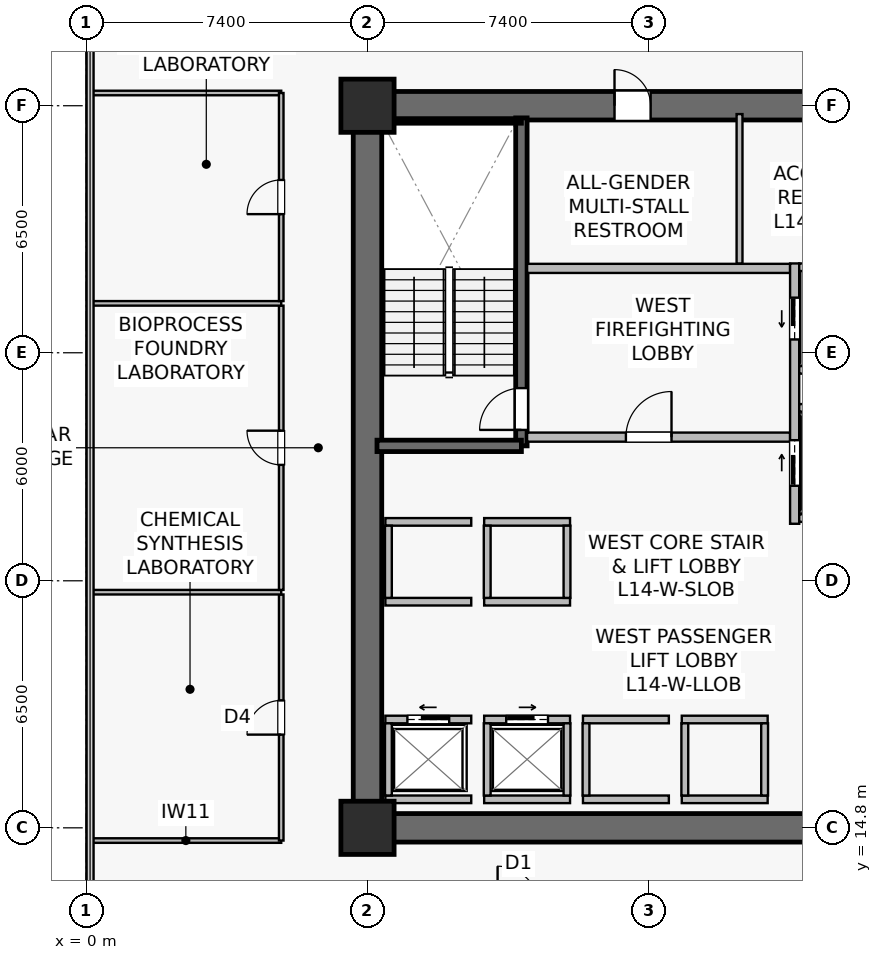
"""IFC4 building model, lengths in metres.
Left out: names, types, materials, properties, quantities, classifications, styles, units other than length and angle.
Written with IfcOpenShell. Run it as: python <this file> out.ifc"""

import sys

from ifc_helpers import new_model, si_unit, direction, frame, frame_2d, origin, origin_2d, place, context, subcontext, project, spatial, rectangle, extrude, source, transform, mapped, element, fill, save


model = new_model("IFC4")
c1 = context("Model", 3, precision=1e-05, world=origin(), true_north=direction((0.0, 1.0)))
c2 = subcontext(c1, "Body", "Model", "MODEL_VIEW")
j1 = project(units=[si_unit("LENGTHUNIT", "METRE"), si_unit("PLANEANGLEUNIT", "RADIAN")], contexts=[c1])
p1 = place(None, origin())
s1 = spatial("IfcSite", under=j1, at=p1, CompositionType="ELEMENT")
p2 = place(p1, origin())
s2 = spatial("IfcBuilding", under=s1, at=p2, CompositionType="ELEMENT")
p3 = place(p2, frame((0.0, 0.0, 58.0)))
s3 = spatial("IfcBuildingStorey", under=s2, at=p3, CompositionType="ELEMENT", Elevation=58.0)
p4 = place(p3, frame((7.025, 14.8, 0.0), z_axis=(0.0, 0.0, 1.0), x_axis=(1.0, 0.0, 0.0)))
e1 = element("IfcWall", 1, at=p4, inside=s3, PredefinedType="SHEAR", context=c2, shape_type="SweptSolid", body=[
    extrude(rectangle(XDim=15.55, YDim=0.75, at=frame_2d((7.775, 0.0))), origin(), (0.0, 0.0, 1.0), 3.78),
])
p5 = place(p3, frame((7.025, 33.8, 0.0), z_axis=(0.0, 0.0, 1.0), x_axis=(1.0, 0.0, 0.0)))
e2 = element("IfcWall", 2, at=p5, inside=s3, PredefinedType="SHEAR", context=c2, shape_type="SweptSolid", body=[
    extrude(rectangle(XDim=15.55, YDim=0.75, at=frame_2d((7.775, 0.0))), origin(), (0.0, 0.0, 1.0), 3.78),
])
p6 = place(p5, frame((6.875, 0.0, 0.0)))
e3 = element("IfcOpeningElement", 3, at=p6, cuts=e2, PredefinedType="OPENING", context=c2, shape_type="SweptSolid", body=[
    extrude(rectangle(XDim=0.95, YDim=2.15, at=frame_2d((0.475, 1.075))), frame((0.0, 0.385, 0.0), z_axis=(0.0, -1.0, 0.0), x_axis=(1.0, 0.0, 0.0)), (0.0, 0.0, 1.0), 0.77),
])
p7 = place(p5, frame((11.94, 0.0, 0.0)))
e4 = element("IfcOpeningElement", 4, at=p7, cuts=e2, PredefinedType="OPENING", context=c2, shape_type="SweptSolid", body=[
    extrude(rectangle(XDim=0.95, YDim=2.15, at=frame_2d((0.475, 1.075))), frame((0.0, 0.385, 0.0), z_axis=(0.0, -1.0, 0.0), x_axis=(1.0, 0.0, 0.0)), (0.0, 0.0, 1.0), 0.77),
])
p8 = place(p3, frame((7.4, 15.175, 0.0), z_axis=(0.0, 0.0, 1.0), x_axis=(0.0, 1.0, 0.0)))
e5 = element("IfcWall", 5, at=p8, inside=s3, PredefinedType="SHEAR", context=c2, shape_type="SweptSolid", body=[
    extrude(rectangle(XDim=18.25, YDim=0.75, at=frame_2d((9.125, 0.0))), origin(), (0.0, 0.0, 1.0), 3.78),
])
p9 = place(p3, frame((11.45, 24.85, 0.0), z_axis=(0.0, 0.0, 1.0), x_axis=(0.0, 1.0, 0.0)))
e6 = element("IfcWall", 6, at=p9, inside=s3, PredefinedType="SHEAR", context=c2, shape_type="SweptSolid", body=[
    extrude(rectangle(XDim=8.63, YDim=0.3, at=frame_2d((4.315, 0.0))), origin(), (0.0, 0.0, 1.0), 3.78),
])
p10 = place(p9, frame((0.42, 0.0, 0.0)))
e7 = element("IfcOpeningElement", 7, at=p10, cuts=e6, PredefinedType="OPENING", context=c2, shape_type="SweptSolid", body=[
    extrude(rectangle(XDim=1.1, YDim=2.15, at=frame_2d((0.55, 1.075))), frame((0.0, 0.16, 0.0), z_axis=(0.0, -1.0, 0.0), x_axis=(1.0, 0.0, 0.0)), (0.0, 0.0, 1.0), 0.32),
])
p11 = place(p3, frame((7.65, 24.85, 0.0), z_axis=(0.0, 0.0, 1.0), x_axis=(1.0, 0.0, 0.0)))
e8 = element("IfcWall", 8, at=p11, inside=s3, PredefinedType="SHEAR", context=c2, shape_type="SweptSolid", body=[
    extrude(rectangle(XDim=3.8, YDim=0.3, at=frame_2d((1.9, 0.0))), origin(), (0.0, 0.0, 1.0), 3.78),
])
p12 = place(p3, frame((7.73, 33.4, 0.0), z_axis=(0.0, 0.0, 1.0), x_axis=(1.0, 0.0, 0.0)))
e9 = element("IfcWall", 9, at=p12, inside=s3, PredefinedType="SOLIDWALL", context=c2, shape_type="SweptSolid", body=[
    extrude(rectangle(XDim=3.72, YDim=0.12, at=frame_2d((1.86, 0.0))), origin(), (0.0, 0.0, 1.0), 3.78),
])
m1 = source(origin(), c2, "Body", "SweptSolid", [
    extrude(rectangle(XDim=1.4, YDim=1.4, at=origin_2d()), origin(), (0.0, 0.0, 1.0), 4.1),
])
for number, where, z_axis, x_axis in (
    (10, (7.4, 14.8, 0.0), (0.0, 0.0, 1.0), (1.0, 0.0, 0.0)),
    (11, (7.4, 33.8, 0.0), (0.0, 0.0, 1.0), (1.0, 0.0, 0.0)),
):
    element("IfcColumn", number, at=place(p3, frame(where, z_axis=z_axis, x_axis=x_axis)), inside=s3, PredefinedType="COLUMN", context=c2, shape_type="MappedRepresentation", body=[
        mapped(m1, transform((0.0, 0.0, 0.0), scale=1.0)),
    ])
p13 = place(p3, frame((11.6, 25.08, 0.0), z_axis=(0.0, 0.0, 1.0), x_axis=(1.0, 0.0, 0.0)))
e12 = element("IfcWall", 12, at=p13, inside=s3, PredefinedType="SOLIDWALL", context=c2, shape_type="SweptSolid", body=[
    extrude(rectangle(XDim=6.92, YDim=0.24, at=frame_2d((3.46, 0.0))), origin(), (0.0, 0.0, 1.0), 3.065),
])
p14 = place(p13, frame((2.6, 0.0, 0.0)))
e13 = element("IfcOpeningElement", 13, at=p14, cuts=e12, PredefinedType="OPENING", context=c2, shape_type="SweptSolid", body=[
    extrude(rectangle(XDim=1.2, YDim=2.16, at=frame_2d((0.6, 1.08))), frame((0.0, 0.13, 0.0), z_axis=(0.0, -1.0, 0.0), x_axis=(1.0, 0.0, 0.0)), (0.0, 0.0, 1.0), 0.26),
])
p15 = place(p3, frame((11.6, 29.52, 0.0), z_axis=(0.0, 0.0, 1.0), x_axis=(1.0, 0.0, 0.0)))
e14 = element("IfcWall", 14, at=p15, inside=s3, PredefinedType="SOLIDWALL", context=c2, shape_type="SweptSolid", body=[
    extrude(rectangle(XDim=6.92, YDim=0.24, at=frame_2d((3.46, 0.0))), origin(), (0.0, 0.0, 1.0), 3.065),
])
p16 = place(p3, frame((18.64, 22.8, 0.0), z_axis=(0.0, 0.0, 1.0), x_axis=(0.0, 1.0, 0.0)))
e15 = element("IfcWall", 15, at=p16, inside=s3, PredefinedType="SOLIDWALL", context=c2, shape_type="SweptSolid", body=[
    extrude(rectangle(XDim=6.85, YDim=0.24, at=frame_2d((3.425, 0.0))), origin(), (0.0, 0.0, 1.0), 2.865),
])
p17 = place(p16, frame((4.85, 0.0, 0.0)))
e16 = element("IfcOpeningElement", 16, at=p17, cuts=e15, PredefinedType="OPENING", context=c2, shape_type="SweptSolid", body=[
    extrude(rectangle(XDim=1.1, YDim=2.22, at=frame_2d((0.55, 1.11))), frame((0.0, 0.13, 0.0), z_axis=(0.0, -1.0, 0.0), x_axis=(1.0, 0.0, 0.0)), (0.0, 0.0, 1.0), 0.26),
])
p18 = place(p16, frame((1.0, 0.0, 0.0)))
e17 = element("IfcOpeningElement", 17, at=p18, cuts=e15, PredefinedType="OPENING", context=c2, shape_type="SweptSolid", body=[
    extrude(rectangle(XDim=1.2, YDim=2.22, at=frame_2d((0.6, 1.11))), frame((0.0, 0.13, 0.0), z_axis=(0.0, -1.0, 0.0), x_axis=(1.0, 0.0, 0.0)), (0.0, 0.0, 1.0), 0.26),
])
p19 = place(p3, frame((7.87, 17.65, 0.0), z_axis=(0.0, 0.0, 1.0), x_axis=(1.0, 0.0, 0.0)))
e18 = element("IfcWall", 18, at=p19, inside=s3, PredefinedType="SOLIDWALL", context=c2, shape_type="SweptSolid", body=[
    extrude(rectangle(XDim=2.26, YDim=0.2, at=frame_2d((1.13, 0.0))), origin(), (0.0, 0.0, 1.0), 3.78),
])
p20 = place(p19, frame((0.58, 0.0, 0.0)))
e19 = element("IfcOpeningElement", 19, at=p20, cuts=e18, PredefinedType="OPENING", context=c2, shape_type="SweptSolid", body=[
    extrude(rectangle(XDim=1.1, YDim=2.22, at=frame_2d((0.55, 1.11))), frame((0.0, 0.11, 0.0), z_axis=(0.0, -1.0, 0.0), x_axis=(1.0, 0.0, 0.0)), (0.0, 0.0, 1.0), 0.22),
])
p21 = place(p3, frame((7.87, 15.55, 0.0), z_axis=(0.0, 0.0, 1.0), x_axis=(1.0, 0.0, 0.0)))
e20 = element("IfcWall", 20, at=p21, inside=s3, PredefinedType="SOLIDWALL", context=c2, shape_type="SweptSolid", body=[
    extrude(rectangle(XDim=2.26, YDim=0.2, at=frame_2d((1.13, 0.0))), origin(), (0.0, 0.0, 1.0), 3.78),
])
p22 = place(p3, frame((7.95, 15.65, 0.0), z_axis=(0.0, 0.0, 1.0), x_axis=(0.0, 1.0, 0.0)))
e21 = element("IfcWall", 21, at=p22, inside=s3, PredefinedType="SOLIDWALL", context=c2, shape_type="SweptSolid", body=[
    extrude(rectangle(XDim=1.9, YDim=0.18, at=frame_2d((0.95, 0.0))), origin(), (0.0, 0.0, 1.0), 3.78),
])
p23 = place(p3, frame((10.47, 17.65, 0.0), z_axis=(0.0, 0.0, 1.0), x_axis=(1.0, 0.0, 0.0)))
e22 = element("IfcWall", 22, at=p23, inside=s3, PredefinedType="SOLIDWALL", context=c2, shape_type="SweptSolid", body=[
    extrude(rectangle(XDim=2.26, YDim=0.2, at=frame_2d((1.13, 0.0))), origin(), (0.0, 0.0, 1.0), 3.78),
])
p24 = place(p23, frame((0.58, 0.0, 0.0)))
e23 = element("IfcOpeningElement", 23, at=p24, cuts=e22, PredefinedType="OPENING", context=c2, shape_type="SweptSolid", body=[
    extrude(rectangle(XDim=1.1, YDim=2.22, at=frame_2d((0.55, 1.11))), frame((0.0, 0.11, 0.0), z_axis=(0.0, -1.0, 0.0), x_axis=(1.0, 0.0, 0.0)), (0.0, 0.0, 1.0), 0.22),
])
p25 = place(p3, frame((10.47, 15.55, 0.0), z_axis=(0.0, 0.0, 1.0), x_axis=(1.0, 0.0, 0.0)))
e24 = element("IfcWall", 24, at=p25, inside=s3, PredefinedType="SOLIDWALL", context=c2, shape_type="SweptSolid", body=[
    extrude(rectangle(XDim=2.26, YDim=0.2, at=frame_2d((1.13, 0.0))), origin(), (0.0, 0.0, 1.0), 3.78),
])
for number, where, z_axis, x_axis in (
    (25, (10.55, 15.65, 0.0), (0.0, 0.0, 1.0), (0.0, 1.0, 0.0)),
    (26, (12.65, 15.65, 0.0), (0.0, 0.0, 1.0), (0.0, 1.0, 0.0)),
):
    element("IfcWall", number, at=place(p3, frame(where, z_axis=z_axis, x_axis=x_axis)), inside=s3, PredefinedType="SOLIDWALL", context=c2, shape_type="SweptSolid", body=[
        extrude(rectangle(XDim=1.9, YDim=0.18, at=frame_2d((0.95, 0.0))), origin(), (0.0, 0.0, 1.0), 3.78),
    ])
for number, where, z_axis, x_axis in (
    (27, (13.07, 17.65, 0.0), (0.0, 0.0, 1.0), (1.0, 0.0, 0.0)),
    (28, (13.07, 15.55, 0.0), (0.0, 0.0, 1.0), (1.0, 0.0, 0.0)),
):
    element("IfcWall", number, at=place(p3, frame(where, z_axis=z_axis, x_axis=x_axis)), inside=s3, PredefinedType="SOLIDWALL", context=c2, shape_type="SweptSolid", body=[
        extrude(rectangle(XDim=2.26, YDim=0.2, at=frame_2d((1.13, 0.0))), origin(), (0.0, 0.0, 1.0), 3.065),
    ])
p26 = place(p3, frame((13.15, 15.65, 0.0), z_axis=(0.0, 0.0, 1.0), x_axis=(0.0, 1.0, 0.0)))
e29 = element("IfcWall", 29, at=p26, inside=s3, PredefinedType="SOLIDWALL", context=c2, shape_type="SweptSolid", body=[
    extrude(rectangle(XDim=1.9, YDim=0.18, at=frame_2d((0.95, 0.0))), origin(), (0.0, 0.0, 1.0), 3.78),
])
for number, where, z_axis, x_axis in (
    (30, (15.67, 17.65, 0.0), (0.0, 0.0, 1.0), (1.0, 0.0, 0.0)),
    (31, (15.67, 15.55, 0.0), (0.0, 0.0, 1.0), (1.0, 0.0, 0.0)),
):
    element("IfcWall", number, at=place(p3, frame(where, z_axis=z_axis, x_axis=x_axis)), inside=s3, PredefinedType="SOLIDWALL", context=c2, shape_type="SweptSolid", body=[
        extrude(rectangle(XDim=2.26, YDim=0.2, at=frame_2d((1.13, 0.0))), origin(), (0.0, 0.0, 1.0), 3.78),
    ])
for number, where, z_axis, x_axis in (
    (32, (15.75, 15.65, 0.0), (0.0, 0.0, 1.0), (0.0, 1.0, 0.0)),
    (33, (17.85, 15.65, 0.0), (0.0, 0.0, 1.0), (0.0, 1.0, 0.0)),
):
    element("IfcWall", number, at=place(p3, frame(where, z_axis=z_axis, x_axis=x_axis)), inside=s3, PredefinedType="SOLIDWALL", context=c2, shape_type="SweptSolid", body=[
        extrude(rectangle(XDim=1.9, YDim=0.18, at=frame_2d((0.95, 0.0))), origin(), (0.0, 0.0, 1.0), 3.78),
    ])
for number, where, z_axis, x_axis in (
    (34, (7.87, 20.75, 0.0), (0.0, 0.0, 1.0), (1.0, 0.0, 0.0)),
    (35, (7.87, 22.85, 0.0), (0.0, 0.0, 1.0), (1.0, 0.0, 0.0)),
):
    element("IfcWall", number, at=place(p3, frame(where, z_axis=z_axis, x_axis=x_axis)), inside=s3, PredefinedType="SOLIDWALL", context=c2, shape_type="SweptSolid", body=[
        extrude(rectangle(XDim=2.26, YDim=0.2, at=frame_2d((1.13, 0.0))), origin(), (0.0, 0.0, 1.0), 3.78),
    ])
p27 = place(p3, frame((7.95, 20.85, 0.0), z_axis=(0.0, 0.0, 1.0), x_axis=(0.0, 1.0, 0.0)))
e36 = element("IfcWall", 36, at=p27, inside=s3, PredefinedType="SOLIDWALL", context=c2, shape_type="SweptSolid", body=[
    extrude(rectangle(XDim=1.9, YDim=0.18, at=frame_2d((0.95, 0.0))), origin(), (0.0, 0.0, 1.0), 3.78),
])
for number, where, z_axis, x_axis in (
    (37, (10.47, 20.75, 0.0), (0.0, 0.0, 1.0), (1.0, 0.0, 0.0)),
    (38, (10.47, 22.85, 0.0), (0.0, 0.0, 1.0), (1.0, 0.0, 0.0)),
):
    element("IfcWall", number, at=place(p3, frame(where, z_axis=z_axis, x_axis=x_axis)), inside=s3, PredefinedType="SOLIDWALL", context=c2, shape_type="SweptSolid", body=[
        extrude(rectangle(XDim=2.26, YDim=0.2, at=frame_2d((1.13, 0.0))), origin(), (0.0, 0.0, 1.0), 3.78),
    ])
for number, where, z_axis, x_axis in (
    (39, (10.55, 20.85, 0.0), (0.0, 0.0, 1.0), (0.0, 1.0, 0.0)),
    (40, (12.65, 20.85, 0.0), (0.0, 0.0, 1.0), (0.0, 1.0, 0.0)),
):
    element("IfcWall", number, at=place(p3, frame(where, z_axis=z_axis, x_axis=x_axis)), inside=s3, PredefinedType="SOLIDWALL", context=c2, shape_type="SweptSolid", body=[
        extrude(rectangle(XDim=1.9, YDim=0.18, at=frame_2d((0.95, 0.0))), origin(), (0.0, 0.0, 1.0), 3.78),
    ])
p28 = place(p3, frame((18.76, 29.55, 0.0), z_axis=(0.0, 0.0, 1.0), x_axis=(1.0, 0.0, 0.0)))
e41 = element("IfcWall", 41, at=p28, inside=s3, PredefinedType="SOLIDWALL", context=c2, shape_type="SweptSolid", body=[
    extrude(rectangle(XDim=2.19, YDim=0.2, at=frame_2d((1.095, 0.0))), origin(), (0.0, 0.0, 1.0), 3.78),
])
p29 = place(p3, frame((18.76, 26.85, 0.0), z_axis=(0.0, 0.0, 1.0), x_axis=(1.0, 0.0, 0.0)))
e42 = element("IfcWall", 42, at=p29, inside=s3, PredefinedType="SOLIDWALL", context=c2, shape_type="SweptSolid", body=[
    extrude(rectangle(XDim=2.19, YDim=0.2, at=frame_2d((1.095, 0.0))), origin(), (0.0, 0.0, 1.0), 3.177),
])
for number, where, z_axis, x_axis in (
    (43, (18.76, 25.85, 0.0), (0.0, 0.0, 1.0), (1.0, 0.0, 0.0)),
    (44, (18.76, 22.95, 0.0), (0.0, 0.0, 1.0), (1.0, 0.0, 0.0)),
):
    element("IfcWall", number, at=place(p3, frame(where, z_axis=z_axis, x_axis=x_axis)), inside=s3, PredefinedType="SOLIDWALL", context=c2, shape_type="SweptSolid", body=[
        extrude(rectangle(XDim=2.19, YDim=0.2, at=frame_2d((1.095, 0.0))), origin(), (0.0, 0.0, 1.0), 3.78),
    ])
p30 = place(p3, frame((17.19, 29.65, 0.0), z_axis=(0.0, 0.0, 1.0), x_axis=(0.0, 1.0, 0.0)))
e45 = element("IfcWall", 45, at=p30, inside=s3, PredefinedType="PLUMBINGWALL", context=c2, shape_type="SweptSolid", body=[
    extrude(rectangle(XDim=3.93, YDim=0.155, at=frame_2d((1.965, 0.0))), origin(), (0.0, 0.0, 1.0), 3.78),
])
for number, where, z_axis, x_axis in (
    (46, (0.11, 14.465, 0.0), (0.0, 0.0, 1.0), (1.0, 0.0, 0.0)),
    (47, (0.11, 34.135, 0.0), (0.0, 0.0, 1.0), (1.0, 0.0, 0.0)),
):
    element("IfcWall", number, at=place(p3, frame(where, z_axis=z_axis, x_axis=x_axis)), inside=s3, PredefinedType="PARTITIONING", context=c2, shape_type="SweptSolid", body=[
        extrude(rectangle(XDim=5.02, YDim=0.12, at=frame_2d((2.51, 0.0))), origin(), (0.0, 0.0, 1.0), 3.78),
    ])
p31 = place(p3, frame((5.13, 14.465, 0.0), z_axis=(0.0, 0.0, 1.0), x_axis=(0.0, 1.0, 0.0)))
e48 = element("IfcWall", 48, at=p31, inside=s3, PredefinedType="PARTITIONING", context=c2, shape_type="SweptSolid", body=[
    extrude(rectangle(XDim=6.475, YDim=0.12, at=frame_2d((3.237, 0.0))), origin(), (0.0, 0.0, 1.0), 3.78),
])
p32 = place(p31, frame((2.788, 0.0, 0.0)))
e49 = element("IfcOpeningElement", 49, at=p32, cuts=e48, PredefinedType="OPENING", context=c2, shape_type="SweptSolid", body=[
    extrude(rectangle(XDim=0.9, YDim=2.1, at=frame_2d((0.45, 1.05))), frame((0.0, 0.07, 0.0), z_axis=(0.0, -1.0, 0.0), x_axis=(1.0, 0.0, 0.0)), (0.0, 0.0, 1.0), 0.14),
])
p33 = place(p3, frame((0.11, 21.0, 0.0), z_axis=(0.0, 0.0, 1.0), x_axis=(1.0, 0.0, 0.0)))
e50 = element("IfcWall", 50, at=p33, inside=s3, PredefinedType="PARTITIONING", context=c2, shape_type="SweptSolid", body=[
    extrude(rectangle(XDim=5.02, YDim=0.12, at=frame_2d((2.51, 0.0))), origin(), (0.0, 0.0, 1.0), 3.78),
])
p34 = place(p3, frame((5.13, 21.06, 0.0), z_axis=(0.0, 0.0, 1.0), x_axis=(0.0, 1.0, 0.0)))
e51 = element("IfcWall", 51, at=p34, inside=s3, PredefinedType="PARTITIONING", context=c2, shape_type="SweptSolid", body=[
    extrude(rectangle(XDim=7.48, YDim=0.12, at=frame_2d((3.74, 0.0))), origin(), (0.0, 0.0, 1.0), 3.78),
])
p35 = place(p34, frame((3.29, 0.0, 0.0)))
e52 = element("IfcOpeningElement", 52, at=p35, cuts=e51, PredefinedType="OPENING", context=c2, shape_type="SweptSolid", body=[
    extrude(rectangle(XDim=0.9, YDim=2.1, at=frame_2d((0.45, 1.05))), frame((0.0, 0.07, 0.0), z_axis=(0.0, -1.0, 0.0), x_axis=(1.0, 0.0, 0.0)), (0.0, 0.0, 1.0), 0.14),
])
p36 = place(p3, frame((0.11, 28.6, 0.0), z_axis=(0.0, 0.0, 1.0), x_axis=(1.0, 0.0, 0.0)))
e53 = element("IfcWall", 53, at=p36, inside=s3, PredefinedType="PARTITIONING", context=c2, shape_type="SweptSolid", body=[
    extrude(rectangle(XDim=5.02, YDim=0.12, at=frame_2d((2.51, 0.0))), origin(), (0.0, 0.0, 1.0), 3.78),
])
p37 = place(p3, frame((5.13, 28.66, 0.0), z_axis=(0.0, 0.0, 1.0), x_axis=(0.0, 1.0, 0.0)))
e54 = element("IfcWall", 54, at=p37, inside=s3, PredefinedType="PARTITIONING", context=c2, shape_type="SweptSolid", body=[
    extrude(rectangle(XDim=5.475, YDim=0.12, at=frame_2d((2.738, 0.0))), origin(), (0.0, 0.0, 1.0), 3.78),
])
p38 = place(p37, frame((2.288, 0.0, 0.0)))
e55 = element("IfcOpeningElement", 55, at=p38, cuts=e54, PredefinedType="OPENING", context=c2, shape_type="SweptSolid", body=[
    extrude(rectangle(XDim=0.9, YDim=2.1, at=frame_2d((0.45, 1.05))), frame((0.0, 0.07, 0.0), z_axis=(0.0, -1.0, 0.0), x_axis=(1.0, 0.0, 0.0)), (0.0, 0.0, 1.0), 0.14),
])
m2 = source(origin(), c2, "Body", "SweptSolid", [
    extrude(rectangle(XDim=1.1, YDim=2.15, at=frame_2d((0.55, 1.075))), frame((0.0, 0.025, 0.0), z_axis=(0.0, -1.0, 0.0), x_axis=(1.0, 0.0, 0.0)), (0.0, 0.0, 1.0), 0.05),
])
p39 = place(p10, origin())
e56 = element("IfcDoor", 56, at=p39, inside=s3, OperationType="SINGLE_SWING_LEFT", PredefinedType="DOOR", context=c2, shape_type="MappedRepresentation", body=[
    mapped(m2, transform((0.0, 0.0, 0.0), scale=1.0)),
])
fill(e7, e56)
m3 = source(origin(), c2, "Body", "SweptSolid", [
    extrude(rectangle(XDim=1.2, YDim=2.16, at=frame_2d((0.6, 1.08))), frame((0.0, 0.025, 0.0), z_axis=(0.0, -1.0, 0.0), x_axis=(1.0, 0.0, 0.0)), (0.0, 0.0, 1.0), 0.05),
])
p40 = place(p14, origin())
e57 = element("IfcDoor", 57, at=p40, inside=s3, OperationType="SINGLE_SWING_RIGHT", PredefinedType="DOOR", context=c2, shape_type="MappedRepresentation", body=[
    mapped(m3, transform((0.0, 0.0, 0.0), scale=1.0)),
])
fill(e13, e57)
m4 = source(origin(), c2, "Body", "SweptSolid", [
    extrude(rectangle(XDim=1.1, YDim=2.22, at=frame_2d((0.55, 1.11))), frame((0.0, 0.025, 0.0), z_axis=(0.0, -1.0, 0.0), x_axis=(1.0, 0.0, 0.0)), (0.0, 0.0, 1.0), 0.05),
])
p41 = place(p20, origin())
e58 = element("IfcDoor", 58, at=p41, inside=s3, OperationType="SLIDING_TO_LEFT", PredefinedType="USERDEFINED", context=c2, shape_type="MappedRepresentation", body=[
    mapped(m4, transform((0.0, 0.0, 0.0), scale=1.0)),
])
fill(e19, e58)
p42 = place(p24, origin())
e59 = element("IfcDoor", 59, at=p42, inside=s3, OperationType="SLIDING_TO_RIGHT", PredefinedType="USERDEFINED", context=c2, shape_type="MappedRepresentation", body=[
    mapped(m4, transform((0.0, 0.0, 0.0), scale=1.0)),
])
fill(e23, e59)
p43 = place(p17, origin())
e60 = element("IfcDoor", 60, at=p43, inside=s3, OperationType="SLIDING_TO_LEFT", PredefinedType="USERDEFINED", context=c2, shape_type="MappedRepresentation", body=[
    mapped(m4, transform((0.0, 0.0, 0.0), scale=1.0)),
])
fill(e16, e60)
m5 = source(origin(), c2, "Body", "SweptSolid", [
    extrude(rectangle(XDim=1.2, YDim=2.22, at=frame_2d((0.6, 1.11))), frame((0.0, 0.025, 0.0), z_axis=(0.0, -1.0, 0.0), x_axis=(1.0, 0.0, 0.0)), (0.0, 0.0, 1.0), 0.05),
])
p44 = place(p18, origin())
e61 = element("IfcDoor", 61, at=p44, inside=s3, OperationType="SLIDING_TO_RIGHT", PredefinedType="USERDEFINED", context=c2, shape_type="MappedRepresentation", body=[
    mapped(m5, transform((0.0, 0.0, 0.0), scale=1.0)),
])
fill(e17, e61)
m6 = source(origin(), c2, "Body", "SweptSolid", [
    extrude(rectangle(XDim=0.95, YDim=2.15, at=frame_2d((0.475, 1.075))), frame((0.0, 0.025, 0.0), z_axis=(0.0, -1.0, 0.0), x_axis=(1.0, 0.0, 0.0)), (0.0, 0.0, 1.0), 0.05),
])
p45 = place(p6, origin())
e62 = element("IfcDoor", 62, at=p45, inside=s3, OperationType="SINGLE_SWING_LEFT", PredefinedType="DOOR", context=c2, shape_type="MappedRepresentation", body=[
    mapped(m6, transform((0.0, 0.0, 0.0), scale=1.0)),
])
fill(e3, e62)
m7 = source(origin(), c2, "Body", "SweptSolid", [
    extrude(rectangle(XDim=0.9, YDim=2.1, at=frame_2d((0.45, 1.05))), frame((0.0, 0.025, 0.0), z_axis=(0.0, -1.0, 0.0), x_axis=(1.0, 0.0, 0.0)), (0.0, 0.0, 1.0), 0.05),
])
p46 = place(p32, origin())
e63 = element("IfcDoor", 63, at=p46, inside=s3, OperationType="SINGLE_SWING_LEFT", PredefinedType="DOOR", context=c2, shape_type="MappedRepresentation", body=[
    mapped(m7, transform((0.0, 0.0, 0.0), scale=1.0)),
])
fill(e49, e63)
p47 = place(p35, origin())
e64 = element("IfcDoor", 64, at=p47, inside=s3, OperationType="SINGLE_SWING_RIGHT", PredefinedType="DOOR", context=c2, shape_type="MappedRepresentation", body=[
    mapped(m7, transform((0.0, 0.0, 0.0), scale=1.0)),
])
fill(e52, e64)
p48 = place(p38, origin())
e65 = element("IfcDoor", 65, at=p48, inside=s3, OperationType="SINGLE_SWING_LEFT", PredefinedType="DOOR", context=c2, shape_type="MappedRepresentation", body=[
    mapped(m7, transform((0.0, 0.0, 0.0), scale=1.0)),
])
fill(e55, e65)
save(model, sys.argv[1])
